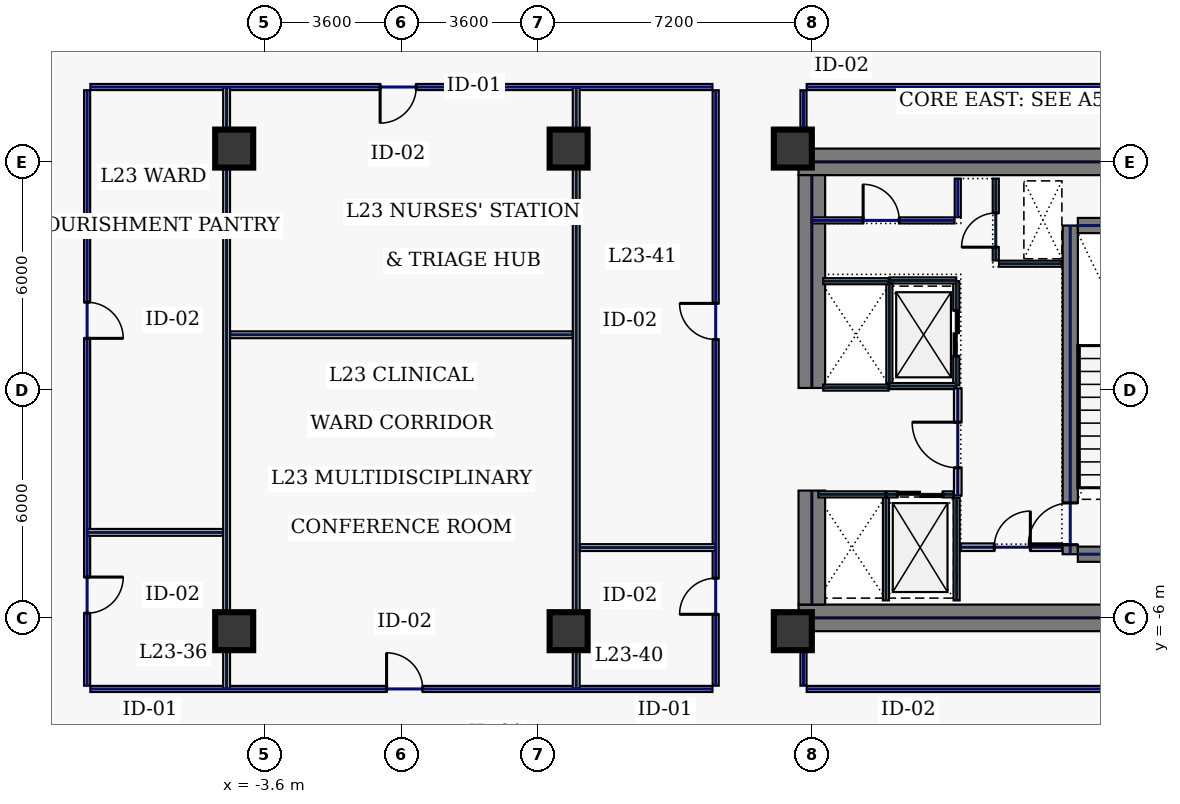
"""IFC4 building model, lengths in metres.
Left out: names, types, materials, properties, quantities, classifications, styles, units other than length and angle.
Written with IfcOpenShell. Run it as: python <this file> out.ifc"""

import sys

from ifc_helpers import new_model, si_unit, direction, frame, frame_2d, origin, origin_2d, place, context, subcontext, project, spatial, rectangle, hollow_rectangle, extrude, element, fill, save


model = new_model("IFC4")
c1 = context("Model", 3, precision=1e-05, world=origin(), true_north=direction((0.0, 1.0)))
c2 = subcontext(c1, "Body", "Model", "MODEL_VIEW")
j1 = project(units=[si_unit("LENGTHUNIT", "METRE"), si_unit("PLANEANGLEUNIT", "RADIAN")], contexts=[c1])
p1 = place(None, origin())
s1 = spatial("IfcSite", under=j1, at=p1, CompositionType="ELEMENT")
p2 = place(p1, origin())
s2 = spatial("IfcBuilding", under=s1, at=p2, CompositionType="ELEMENT")
p3 = place(p2, frame((0.0, 0.0, 105.4)))
s3 = spatial("IfcBuildingStorey", under=s2, at=p3, CompositionType="ELEMENT", Elevation=105.4)
for number, where, z_axis, x_axis in (
    (1, (10.45, 6.0, 0.0), (0.0, 0.0, 1.0), (1.0, 0.0, 0.0)),
    (2, (10.45, -6.0, 0.0), (0.0, 0.0, 1.0), (1.0, 0.0, 0.0)),
):
    element("IfcWall", number, at=place(p3, frame(where, z_axis=z_axis, x_axis=x_axis)), inside=s3, PredefinedType="SHEAR", context=c2, shape_type="SweptSolid", body=[
        extrude(rectangle(XDim=11.55, YDim=0.7, at=frame_2d((5.775, 0.0))), origin(), (0.0, 0.0, 1.0), 3.74),
    ])
p4 = place(p3, frame((10.8, -5.65, 0.0), z_axis=(0.0, 0.0, 1.0), x_axis=(0.0, 1.0, 0.0)))
e3 = element("IfcWall", 3, at=p4, inside=s3, PredefinedType="SHEAR", context=c2, shape_type="SweptSolid", body=[
    extrude(rectangle(XDim=3.0, YDim=0.7, at=frame_2d((1.5, 0.0))), origin(), (0.0, 0.0, 1.0), 3.74),
])
p5 = place(p3, frame((10.8, 0.05, 0.0), z_axis=(0.0, 0.0, 1.0), x_axis=(0.0, 1.0, 0.0)))
e4 = element("IfcWall", 4, at=p5, inside=s3, PredefinedType="SHEAR", context=c2, shape_type="SweptSolid", body=[
    extrude(rectangle(XDim=5.6, YDim=0.7, at=frame_2d((2.8, 0.0))), origin(), (0.0, 0.0, 1.0), 3.74),
])
p6 = place(p3, frame((17.6, -4.325, 0.0), z_axis=(0.0, 0.0, 1.0), x_axis=(0.0, 1.0, 0.0)))
e5 = element("IfcWall", 5, at=p6, inside=s3, PredefinedType="SHEAR", context=c2, shape_type="SweptSolid", body=[
    extrude(rectangle(XDim=8.65, YDim=0.4, at=frame_2d((4.325, 0.0))), origin(), (0.0, 0.0, 1.0), 3.74),
])
p7 = place(p6, frame((0.25, 0.0, 0.0)))
e6 = element("IfcOpeningElement", 6, at=p7, cuts=e5, PredefinedType="OPENING", context=c2, shape_type="SweptSolid", body=[
    extrude(rectangle(XDim=1.1, YDim=2.2, at=frame_2d((0.55, 1.1))), frame((0.0, 0.21, 0.0), z_axis=(0.0, -1.0, 0.0), x_axis=(1.0, 0.0, 0.0)), (0.0, 0.0, 1.0), 0.42),
])
for number, where, z_axis, x_axis in (
    (7, (17.8, -4.325, 0.0), (0.0, 0.0, 1.0), (1.0, 0.0, 0.0)),
    (8, (17.8, 4.325, 0.0), (0.0, 0.0, 1.0), (1.0, 0.0, 0.0)),
):
    element("IfcWall", number, at=place(p3, frame(where, z_axis=z_axis, x_axis=x_axis)), inside=s3, PredefinedType="SHEAR", context=c2, shape_type="SweptSolid", body=[
        extrude(rectangle(XDim=3.4, YDim=0.4, at=frame_2d((1.7, 0.0))), origin(), (0.0, 0.0, 1.0), 3.74),
    ])
for number, where, z_axis, x_axis in (
    (9, (10.3, -6.35, 0.0), (0.0, 0.0, 1.0), (1.0, 0.0, 0.0)),
    (10, (10.3, 6.35, 0.0), (0.0, 0.0, 1.0), (1.0, 0.0, 0.0)),
    (11, (-4.4, -6.35, 0.0), (0.0, 0.0, 1.0), (1.0, 0.0, 0.0)),
    (12, (4.4, -6.35, 0.0), (0.0, 0.0, 1.0), (1.0, 0.0, 0.0)),
    (13, (-4.4, 6.35, 0.0), (0.0, 0.0, 1.0), (1.0, 0.0, 0.0)),
    (14, (4.4, 6.35, 0.0), (0.0, 0.0, 1.0), (1.0, 0.0, 0.0)),
):
    element("IfcColumn", number, at=place(p3, frame(where, z_axis=z_axis, x_axis=x_axis)), inside=s3, PredefinedType="COLUMN", context=c2, shape_type="SweptSolid", body=[
        extrude(hollow_rectangle(XDim=1.0, YDim=1.0, WallThickness=0.045, at=origin_2d()), origin(), (0.0, 0.0, 1.0), 3.74),
    ])
p8 = place(p3, frame((14.6, 0.12, 0.0), z_axis=(0.0, 0.0, 1.0), x_axis=(0.0, 1.0, 0.0)))
e15 = element("IfcWall", 15, at=p8, inside=s3, PredefinedType="PARTITIONING", context=c2, shape_type="SweptSolid", body=[
    extrude(rectangle(XDim=2.74, YDim=0.16, at=frame_2d((1.37, 0.0))), origin(), (0.0, 0.0, 1.0), 3.74),
])
p9 = place(p8, frame((0.77, 0.0, 0.0)))
e16 = element("IfcOpeningElement", 16, at=p9, cuts=e15, PredefinedType="OPENING", context=c2, shape_type="SweptSolid", body=[
    extrude(rectangle(XDim=1.2, YDim=2.2, at=frame_2d((0.6, 1.1))), frame((0.0, 0.09, 0.0), z_axis=(0.0, -1.0, 0.0), x_axis=(1.0, 0.0, 0.0)), (0.0, 0.0, 1.0), 0.18),
])
for number, where, z_axis, x_axis in (
    (17, (12.84, 0.1, 0.0), (0.0, 0.0, 1.0), (1.0, 0.0, 0.0)),
    (18, (12.84, 2.88, 0.0), (0.0, 0.0, 1.0), (1.0, 0.0, 0.0)),
):
    element("IfcWall", number, at=place(p3, frame(where, z_axis=z_axis, x_axis=x_axis)), inside=s3, PredefinedType="PARTITIONING", context=c2, shape_type="SweptSolid", body=[
        extrude(rectangle(XDim=1.76, YDim=0.16, at=frame_2d((0.88, 0.0))), origin(), (0.0, 0.0, 1.0), 3.74),
    ])
p10 = place(p3, frame((12.84, 0.18, 0.0), z_axis=(0.0, 0.0, 1.0), x_axis=(0.0, 1.0, 0.0)))
e19 = element("IfcWall", 19, at=p10, inside=s3, PredefinedType="PARTITIONING", context=c2, shape_type="SweptSolid", body=[
    extrude(rectangle(XDim=2.62, YDim=0.16, at=frame_2d((1.31, 0.0))), origin(), (0.0, 0.0, 1.0), 3.74),
])
p11 = place(p3, frame((12.77, -2.75, 0.0), z_axis=(0.0, 0.0, 1.0), x_axis=(1.0, 0.0, 0.0)))
e20 = element("IfcWall", 20, at=p11, inside=s3, PredefinedType="PARTITIONING", context=c2, shape_type="SweptSolid", body=[
    extrude(rectangle(XDim=1.76, YDim=0.16, at=frame_2d((0.88, 0.0))), origin(), (0.0, 0.0, 1.0), 3.74),
])
p12 = place(p11, frame((0.28, 0.0, 0.0)))
e21 = element("IfcOpeningElement", 21, at=p12, cuts=e20, PredefinedType="OPENING", context=c2, shape_type="SweptSolid", body=[
    extrude(rectangle(XDim=1.2, YDim=2.2, at=frame_2d((0.6, 1.1))), frame((0.0, 0.09, 0.0), z_axis=(0.0, -1.0, 0.0), x_axis=(1.0, 0.0, 0.0)), (0.0, 0.0, 1.0), 0.18),
])
for number, where, z_axis, x_axis in (
    (22, (12.75, -5.54, 0.0), (0.0, 0.0, 1.0), (0.0, 1.0, 0.0)),
    (23, (14.61, -5.54, 0.0), (0.0, 0.0, 1.0), (0.0, 1.0, 0.0)),
):
    element("IfcWall", number, at=place(p3, frame(where, z_axis=z_axis, x_axis=x_axis)), inside=s3, PredefinedType="PARTITIONING", context=c2, shape_type="SweptSolid", body=[
        extrude(rectangle(XDim=2.7, YDim=0.16, at=frame_2d((1.35, 0.0))), origin(), (0.0, 0.0, 1.0), 3.74),
    ])
p13 = place(p3, frame((10.97, -2.75, 0.0), z_axis=(0.0, 0.0, 1.0), x_axis=(1.0, 0.0, 0.0)))
e24 = element("IfcWall", 24, at=p13, inside=s3, PredefinedType="PARTITIONING", context=c2, shape_type="SweptSolid", body=[
    extrude(rectangle(XDim=1.76, YDim=0.16, at=frame_2d((0.88, 0.0))), origin(), (0.0, 0.0, 1.0), 3.74),
])
for number, where, z_axis, x_axis in (
    (25, (11.1, 0.06, 0.0), (0.0, 0.0, 1.0), (1.0, 0.0, 0.0)),
    (26, (11.1, 2.86, 0.0), (0.0, 0.0, 1.0), (1.0, 0.0, 0.0)),
):
    element("IfcWall", number, at=place(p3, frame(where, z_axis=z_axis, x_axis=x_axis)), inside=s3, PredefinedType="PARTITIONING", context=c2, shape_type="SweptSolid", body=[
        extrude(rectangle(XDim=1.72, YDim=0.16, at=frame_2d((0.86, 0.0))), origin(), (0.0, 0.0, 1.0), 3.74),
    ])
p14 = place(p3, frame((15.64, 3.405, 0.0), z_axis=(0.0, 0.0, 1.0), x_axis=(0.0, 1.0, 0.0)))
e27 = element("IfcWall", 27, at=p14, inside=s3, PredefinedType="PARTITIONING", context=c2, shape_type="SweptSolid", body=[
    extrude(rectangle(XDim=2.155, YDim=0.16, at=frame_2d((1.078, 0.0))), origin(), (0.0, 0.0, 1.0), 3.74),
])
p15 = place(p14, frame((0.35, 0.0, 0.0)))
e28 = element("IfcOpeningElement", 28, at=p15, cuts=e27, PredefinedType="OPENING", context=c2, shape_type="SweptSolid", body=[
    extrude(rectangle(XDim=0.9, YDim=2.2, at=frame_2d((0.45, 1.1))), frame((0.0, 0.09, 0.0), z_axis=(0.0, -1.0, 0.0), x_axis=(1.0, 0.0, 0.0)), (0.0, 0.0, 1.0), 0.18),
])
p16 = place(p3, frame((15.725, 3.32, 0.0), z_axis=(0.0, 0.0, 1.0), x_axis=(1.0, 0.0, 0.0)))
e29 = element("IfcWall", 29, at=p16, inside=s3, PredefinedType="PARTITIONING", context=c2, shape_type="SweptSolid", body=[
    extrude(rectangle(XDim=1.655, YDim=0.16, at=frame_2d((0.827, 0.0))), origin(), (0.0, 0.0, 1.0), 3.74),
])
p17 = place(p3, frame((14.72, -4.14, 0.0), z_axis=(0.0, 0.0, 1.0), x_axis=(1.0, 0.0, 0.0)))
e30 = element("IfcWall", 30, at=p17, inside=s3, PredefinedType="SOLIDWALL", context=c2, shape_type="SweptSolid", body=[
    extrude(rectangle(XDim=2.66, YDim=0.2, at=frame_2d((1.33, 0.0))), origin(), (0.0, 0.0, 1.0), 3.74),
])
p18 = place(p17, frame((0.88, 0.0, 0.0)))
e31 = element("IfcOpeningElement", 31, at=p18, cuts=e30, PredefinedType="OPENING", context=c2, shape_type="SweptSolid", body=[
    extrude(rectangle(XDim=0.95, YDim=2.2, at=frame_2d((0.475, 1.1))), frame((0.0, 0.11, 0.0), z_axis=(0.0, -1.0, 0.0), x_axis=(1.0, 0.0, 0.0)), (0.0, 0.0, 1.0), 0.22),
])
p19 = place(p3, frame((10.8, 4.46, 0.0), z_axis=(0.0, 0.0, 1.0), x_axis=(1.0, 0.0, 0.0)))
e32 = element("IfcWall", 32, at=p19, inside=s3, PredefinedType="PARTITIONING", context=c2, shape_type="SweptSolid", body=[
    extrude(rectangle(XDim=3.755, YDim=0.16, at=frame_2d((1.877, 0.0))), origin(), (0.0, 0.0, 1.0), 3.74),
])
p20 = place(p19, frame((1.35, 0.0, 0.0)))
e33 = element("IfcOpeningElement", 33, at=p20, cuts=e32, PredefinedType="OPENING", context=c2, shape_type="SweptSolid", body=[
    extrude(rectangle(XDim=0.95, YDim=2.2, at=frame_2d((0.475, 1.1))), frame((0.0, 0.09, 0.0), z_axis=(0.0, -1.0, 0.0), x_axis=(1.0, 0.0, 0.0)), (0.0, 0.0, 1.0), 0.18),
])
p21 = place(p3, frame((14.64, 4.545, 0.0), z_axis=(0.0, 0.0, 1.0), x_axis=(0.0, 1.0, 0.0)))
e34 = element("IfcWall", 34, at=p21, inside=s3, PredefinedType="PARTITIONING", context=c2, shape_type="SweptSolid", body=[
    extrude(rectangle(XDim=1.015, YDim=0.16, at=frame_2d((0.508, 0.0))), origin(), (0.0, 0.0, 1.0), 3.74),
])
p22 = place(p3, frame((14.64, -2.78, 0.0), z_axis=(0.0, 0.0, 1.0), x_axis=(0.0, 1.0, 0.0)))
e35 = element("IfcWall", 35, at=p22, inside=s3, PredefinedType="SOLIDWALL", context=c2, shape_type="SweptSolid", body=[
    extrude(rectangle(XDim=2.82, YDim=0.2, at=frame_2d((1.41, 0.0))), origin(), (0.0, 0.0, 1.0), 3.74),
])
p23 = place(p22, frame((0.73, 0.0, 0.0)))
e36 = element("IfcOpeningElement", 36, at=p23, cuts=e35, PredefinedType="OPENING", context=c2, shape_type="SweptSolid", body=[
    extrude(rectangle(XDim=1.2, YDim=2.2, at=frame_2d((0.6, 1.1))), frame((0.0, 0.11, 0.0), z_axis=(0.0, -1.0, 0.0), x_axis=(1.0, 0.0, 0.0)), (0.0, 0.0, 1.0), 0.22),
])
p24 = place(p3, frame((25.235, 7.97, 0.0), z_axis=(0.0, 0.0, 1.0), x_axis=(-1.0, 0.0, 0.0)))
e37 = element("IfcWall", 37, at=p24, inside=s3, PredefinedType="PARTITIONING", context=c2, shape_type="SweptSolid", body=[
    extrude(rectangle(XDim=14.57, YDim=0.16, at=frame_2d((7.285, 0.0))), origin(), (0.0, 0.0, 1.0), 3.74),
])
p25 = place(p3, frame((10.58, 7.885, 0.0), z_axis=(0.0, 0.0, 1.0), x_axis=(0.0, -1.0, 0.0)))
e38 = element("IfcWall", 38, at=p25, inside=s3, PredefinedType="PARTITIONING", context=c2, shape_type="SweptSolid", body=[
    extrude(rectangle(XDim=1.465, YDim=0.16, at=frame_2d((0.732, 0.0))), origin(), (0.0, 0.0, 1.0), 3.74),
])
p26 = place(p3, frame((10.58, -6.42, 0.0), z_axis=(0.0, 0.0, 1.0), x_axis=(0.0, -1.0, 0.0)))
e39 = element("IfcWall", 39, at=p26, inside=s3, PredefinedType="PARTITIONING", context=c2, shape_type="SweptSolid", body=[
    extrude(rectangle(XDim=1.365, YDim=0.16, at=frame_2d((0.683, 0.0))), origin(), (0.0, 0.0, 1.0), 3.74),
])
p27 = place(p3, frame((10.665, -7.87, 0.0), z_axis=(0.0, 0.0, 1.0), x_axis=(1.0, 0.0, 0.0)))
e40 = element("IfcWall", 40, at=p27, inside=s3, PredefinedType="PARTITIONING", context=c2, shape_type="SweptSolid", body=[
    extrude(rectangle(XDim=14.57, YDim=0.16, at=frame_2d((7.285, 0.0))), origin(), (0.0, 0.0, 1.0), 3.74),
])
p28 = place(p3, frame((8.27, -7.785, 0.0), z_axis=(0.0, 0.0, 1.0), x_axis=(0.0, 1.0, 0.0)))
e41 = element("IfcWall", 41, at=p28, inside=s3, PredefinedType="PARTITIONING", context=c2, shape_type="SweptSolid", body=[
    extrude(rectangle(XDim=15.67, YDim=0.16, at=frame_2d((7.835, 0.0))), origin(), (0.0, 0.0, 1.0), 3.74),
])
p29 = place(p28, frame((1.879, 0.0, 0.0)))
e42 = element("IfcOpeningElement", 42, at=p29, cuts=e41, PredefinedType="OPENING", context=c2, shape_type="SweptSolid", body=[
    extrude(rectangle(XDim=0.95, YDim=2.2, at=frame_2d((0.475, 1.1))), frame((0.0, 0.09, 0.0), z_axis=(0.0, -1.0, 0.0), x_axis=(1.0, 0.0, 0.0)), (0.0, 0.0, 1.0), 0.18),
])
p30 = place(p28, frame((9.111, 0.0, 0.0)))
e43 = element("IfcOpeningElement", 43, at=p30, cuts=e41, PredefinedType="OPENING", context=c2, shape_type="SweptSolid", body=[
    extrude(rectangle(XDim=0.95, YDim=2.2, at=frame_2d((0.475, 1.1))), frame((0.0, 0.09, 0.0), z_axis=(0.0, -1.0, 0.0), x_axis=(1.0, 0.0, 0.0)), (0.0, 0.0, 1.0), 0.18),
])
p31 = place(p3, frame((8.185, 7.97, 0.0), z_axis=(0.0, 0.0, 1.0), x_axis=(-1.0, 0.0, 0.0)))
e44 = element("IfcWall", 44, at=p31, inside=s3, PredefinedType="PARTITIONING", context=c2, shape_type="SweptSolid", body=[
    extrude(rectangle(XDim=16.37, YDim=0.16, at=frame_2d((8.185, 0.0))), origin(), (0.0, 0.0, 1.0), 3.74),
])
p32 = place(p31, frame((7.795, 0.0, 0.0)))
e45 = element("IfcOpeningElement", 45, at=p32, cuts=e44, PredefinedType="OPENING", context=c2, shape_type="SweptSolid", body=[
    extrude(rectangle(XDim=0.95, YDim=2.2, at=frame_2d((0.475, 1.1))), frame((0.0, 0.09, 0.0), z_axis=(0.0, -1.0, 0.0), x_axis=(1.0, 0.0, 0.0)), (0.0, 0.0, 1.0), 0.18),
])
p33 = place(p3, frame((-8.27, 7.885, 0.0), z_axis=(0.0, 0.0, 1.0), x_axis=(0.0, -1.0, 0.0)))
e46 = element("IfcWall", 46, at=p33, inside=s3, PredefinedType="PARTITIONING", context=c2, shape_type="SweptSolid", body=[
    extrude(rectangle(XDim=15.67, YDim=0.16, at=frame_2d((7.835, 0.0))), origin(), (0.0, 0.0, 1.0), 3.74),
])
p34 = place(p33, frame((12.811, 0.0, 0.0)))
e47 = element("IfcOpeningElement", 47, at=p34, cuts=e46, PredefinedType="OPENING", context=c2, shape_type="SweptSolid", body=[
    extrude(rectangle(XDim=0.95, YDim=2.2, at=frame_2d((0.475, 1.1))), frame((0.0, 0.09, 0.0), z_axis=(0.0, -1.0, 0.0), x_axis=(1.0, 0.0, 0.0)), (0.0, 0.0, 1.0), 0.18),
])
p35 = place(p33, frame((5.579, 0.0, 0.0)))
e48 = element("IfcOpeningElement", 48, at=p35, cuts=e46, PredefinedType="OPENING", context=c2, shape_type="SweptSolid", body=[
    extrude(rectangle(XDim=0.95, YDim=2.2, at=frame_2d((0.475, 1.1))), frame((0.0, 0.09, 0.0), z_axis=(0.0, -1.0, 0.0), x_axis=(1.0, 0.0, 0.0)), (0.0, 0.0, 1.0), 0.18),
])
p36 = place(p3, frame((-8.185, -7.87, 0.0), z_axis=(0.0, 0.0, 1.0), x_axis=(1.0, 0.0, 0.0)))
e49 = element("IfcWall", 49, at=p36, inside=s3, PredefinedType="PARTITIONING", context=c2, shape_type="SweptSolid", body=[
    extrude(rectangle(XDim=16.37, YDim=0.16, at=frame_2d((8.185, 0.0))), origin(), (0.0, 0.0, 1.0), 3.74),
])
p37 = place(p36, frame((7.795, 0.0, 0.0)))
e50 = element("IfcOpeningElement", 50, at=p37, cuts=e49, PredefinedType="OPENING", context=c2, shape_type="SweptSolid", body=[
    extrude(rectangle(XDim=0.95, YDim=2.2, at=frame_2d((0.475, 1.1))), frame((0.0, 0.09, 0.0), z_axis=(0.0, -1.0, 0.0), x_axis=(1.0, 0.0, 0.0)), (0.0, 0.0, 1.0), 0.18),
])
for number, where, z_axis, x_axis in (
    (51, (-4.6, -7.865, 0.0), (0.0, 0.0, 1.0), (0.0, 1.0, 0.0)),
    (52, (4.6, -7.865, 0.0), (0.0, 0.0, 1.0), (0.0, 1.0, 0.0)),
):
    element("IfcWall", number, at=place(p3, frame(where, z_axis=z_axis, x_axis=x_axis)), inside=s3, PredefinedType="PARTITIONING", context=c2, shape_type="SweptSolid", body=[
        extrude(rectangle(XDim=15.83, YDim=0.18, at=frame_2d((7.915, 0.0))), origin(), (0.0, 0.0, 1.0), 2.935),
    ])
p38 = place(p3, frame((-4.505, 1.45, 0.0), z_axis=(0.0, 0.0, 1.0), x_axis=(1.0, 0.0, 0.0)))
e53 = element("IfcWall", 53, at=p38, inside=s3, PredefinedType="PARTITIONING", context=c2, shape_type="SweptSolid", body=[
    extrude(rectangle(XDim=9.01, YDim=0.18, at=frame_2d((4.505, 0.0))), origin(), (0.0, 0.0, 1.0), 3.74),
])
for number, where, z_axis, x_axis in (
    (54, (-8.265, -3.75, 0.0), (0.0, 0.0, 1.0), (1.0, 0.0, 0.0)),
    (55, (4.695, -4.15, 0.0), (0.0, 0.0, 1.0), (1.0, 0.0, 0.0)),
):
    element("IfcWall", number, at=place(p3, frame(where, z_axis=z_axis, x_axis=x_axis)), inside=s3, PredefinedType="PARTITIONING", context=c2, shape_type="SweptSolid", body=[
        extrude(rectangle(XDim=3.57, YDim=0.18, at=frame_2d((1.785, 0.0))), origin(), (0.0, 0.0, 1.0), 3.74),
    ])
p39 = place(p7, origin())
e56 = element("IfcDoor", 56, at=p39, inside=s3, OperationType="SINGLE_SWING_LEFT", PredefinedType="DOOR", context=c2, shape_type="SweptSolid", body=[
    extrude(rectangle(XDim=1.1, YDim=2.2, at=frame_2d((0.55, 1.1))), frame((0.0, 0.025, 0.0), z_axis=(0.0, -1.0, 0.0), x_axis=(1.0, 0.0, 0.0)), (0.0, 0.0, 1.0), 0.05),
])
fill(e6, e56)
p40 = place(p9, origin())
e57 = element("IfcDoor", 57, at=p40, inside=s3, OperationType="SLIDING_TO_LEFT", PredefinedType="DOOR", context=c2, shape_type="SweptSolid", body=[
    extrude(rectangle(XDim=1.2, YDim=2.2, at=frame_2d((0.6, 1.1))), frame((0.0, 0.025, 0.0), z_axis=(0.0, -1.0, 0.0), x_axis=(1.0, 0.0, 0.0)), (0.0, 0.0, 1.0), 0.05),
])
fill(e16, e57)
p41 = place(p12, origin())
e58 = element("IfcDoor", 58, at=p41, inside=s3, OperationType="SLIDING_TO_LEFT", PredefinedType="DOOR", context=c2, shape_type="SweptSolid", body=[
    extrude(rectangle(XDim=1.2, YDim=2.2, at=frame_2d((0.6, 1.1))), frame((0.0, 0.025, 0.0), z_axis=(0.0, -1.0, 0.0), x_axis=(1.0, 0.0, 0.0)), (0.0, 0.0, 1.0), 0.05),
])
fill(e21, e58)
p42 = place(p15, origin())
e59 = element("IfcDoor", 59, at=p42, inside=s3, OperationType="SINGLE_SWING_LEFT", PredefinedType="DOOR", context=c2, shape_type="SweptSolid", body=[
    extrude(rectangle(XDim=0.9, YDim=2.2, at=frame_2d((0.45, 1.1))), frame((0.0, 0.025, 0.0), z_axis=(0.0, -1.0, 0.0), x_axis=(1.0, 0.0, 0.0)), (0.0, 0.0, 1.0), 0.05),
])
fill(e28, e59)
p43 = place(p18, origin())
e60 = element("IfcDoor", 60, at=p43, inside=s3, OperationType="SINGLE_SWING_RIGHT", PredefinedType="DOOR", context=c2, shape_type="SweptSolid", body=[
    extrude(rectangle(XDim=0.95, YDim=2.2, at=frame_2d((0.475, 1.1))), frame((0.0, 0.025, 0.0), z_axis=(0.0, -1.0, 0.0), x_axis=(1.0, 0.0, 0.0)), (0.0, 0.0, 1.0), 0.05),
])
fill(e31, e60)
p44 = place(p20, origin())
e61 = element("IfcDoor", 61, at=p44, inside=s3, OperationType="SINGLE_SWING_LEFT", PredefinedType="DOOR", context=c2, shape_type="SweptSolid", body=[
    extrude(rectangle(XDim=0.95, YDim=2.2, at=frame_2d((0.475, 1.1))), frame((0.0, 0.025, 0.0), z_axis=(0.0, -1.0, 0.0), x_axis=(1.0, 0.0, 0.0)), (0.0, 0.0, 1.0), 0.05),
])
fill(e33, e61)
p45 = place(p23, origin())
e62 = element("IfcDoor", 62, at=p45, inside=s3, OperationType="SINGLE_SWING_RIGHT", PredefinedType="DOOR", context=c2, shape_type="SweptSolid", body=[
    extrude(rectangle(XDim=1.2, YDim=2.2, at=frame_2d((0.6, 1.1))), frame((0.0, 0.025, 0.0), z_axis=(0.0, -1.0, 0.0), x_axis=(1.0, 0.0, 0.0)), (0.0, 0.0, 1.0), 0.05),
])
fill(e36, e62)
p46 = place(p34, origin())
e63 = element("IfcDoor", 63, at=p46, inside=s3, OperationType="SINGLE_SWING_LEFT", PredefinedType="DOOR", context=c2, shape_type="SweptSolid", body=[
    extrude(rectangle(XDim=0.95, YDim=2.2, at=frame_2d((0.475, 1.1))), frame((0.0, 0.025, 0.0), z_axis=(0.0, -1.0, 0.0), x_axis=(1.0, 0.0, 0.0)), (0.0, 0.0, 1.0), 0.05),
])
fill(e47, e63)
p47 = place(p35, origin())
e64 = element("IfcDoor", 64, at=p47, inside=s3, OperationType="SINGLE_SWING_RIGHT", PredefinedType="DOOR", context=c2, shape_type="SweptSolid", body=[
    extrude(rectangle(XDim=0.95, YDim=2.2, at=frame_2d((0.475, 1.1))), frame((0.0, 0.025, 0.0), z_axis=(0.0, -1.0, 0.0), x_axis=(1.0, 0.0, 0.0)), (0.0, 0.0, 1.0), 0.05),
])
fill(e48, e64)
p48 = place(p37, origin())
e65 = element("IfcDoor", 65, at=p48, inside=s3, OperationType="SINGLE_SWING_LEFT", PredefinedType="DOOR", context=c2, shape_type="SweptSolid", body=[
    extrude(rectangle(XDim=0.95, YDim=2.2, at=frame_2d((0.475, 1.1))), frame((0.0, 0.025, 0.0), z_axis=(0.0, -1.0, 0.0), x_axis=(1.0, 0.0, 0.0)), (0.0, 0.0, 1.0), 0.05),
])
fill(e50, e65)
p49 = place(p32, origin())
e66 = element("IfcDoor", 66, at=p49, inside=s3, OperationType="SINGLE_SWING_RIGHT", PredefinedType="DOOR", context=c2, shape_type="SweptSolid", body=[
    extrude(rectangle(XDim=0.95, YDim=2.2, at=frame_2d((0.475, 1.1))), frame((0.0, 0.025, 0.0), z_axis=(0.0, -1.0, 0.0), x_axis=(1.0, 0.0, 0.0)), (0.0, 0.0, 1.0), 0.05),
])
fill(e45, e66)
p50 = place(p29, origin())
e67 = element("IfcDoor", 67, at=p50, inside=s3, OperationType="SINGLE_SWING_LEFT", PredefinedType="DOOR", context=c2, shape_type="SweptSolid", body=[
    extrude(rectangle(XDim=0.95, YDim=2.2, at=frame_2d((0.475, 1.1))), frame((0.0, 0.025, 0.0), z_axis=(0.0, -1.0, 0.0), x_axis=(1.0, 0.0, 0.0)), (0.0, 0.0, 1.0), 0.05),
])
fill(e42, e67)
p51 = place(p30, origin())
e68 = element("IfcDoor", 68, at=p51, inside=s3, OperationType="SINGLE_SWING_RIGHT", PredefinedType="DOOR", context=c2, shape_type="SweptSolid", body=[
    extrude(rectangle(XDim=0.95, YDim=2.2, at=frame_2d((0.475, 1.1))), frame((0.0, 0.025, 0.0), z_axis=(0.0, -1.0, 0.0), x_axis=(1.0, 0.0, 0.0)), (0.0, 0.0, 1.0), 0.05),
])
fill(e43, e68)
save(model, sys.argv[1])
